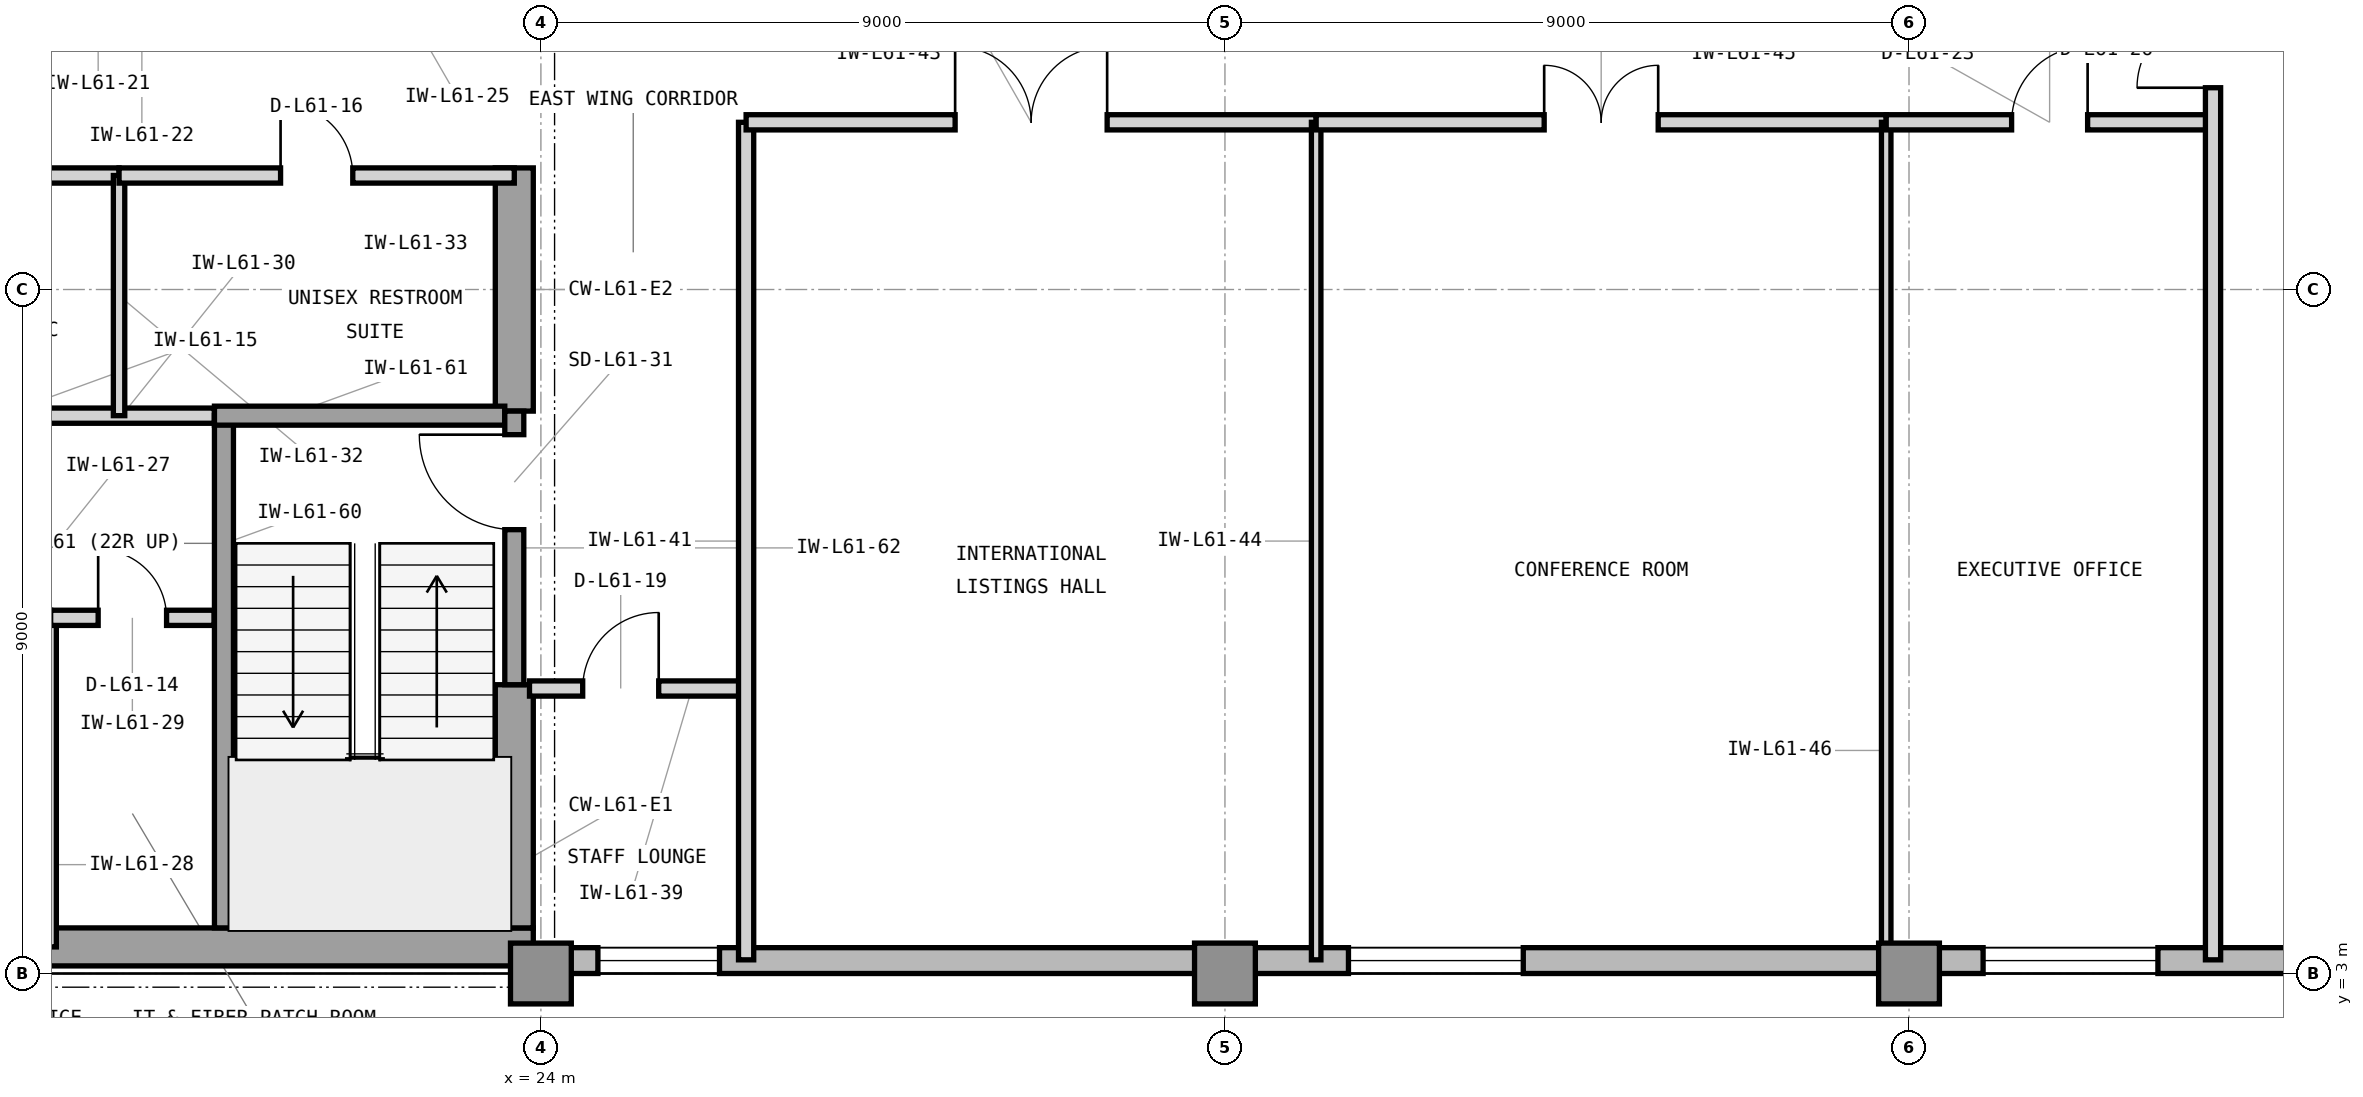
"""IFC4 building model, lengths in metres.
Left out: names, types, materials, properties, quantities, classifications, styles, units other than length and angle.
Written with IfcOpenShell. Run it as: python <this file> out.ifc"""

import sys

from ifc_helpers import new_model, si_unit, direction, frame, frame_2d, origin, origin_2d, place, context, subcontext, project, spatial, rectangle, extrude, element, fill, save


model = new_model("IFC4")
c1 = context("Model", 3, precision=1e-05, world=origin(), true_north=direction((0.0, 1.0)))
c2 = subcontext(c1, "Body", "Model", "MODEL_VIEW")
j1 = project(units=[si_unit("LENGTHUNIT", "METRE"), si_unit("PLANEANGLEUNIT", "RADIAN")], contexts=[c1])
p1 = place(None, origin())
s1 = spatial("IfcSite", under=j1, at=p1, CompositionType="ELEMENT")
p2 = place(p1, origin())
s2 = spatial("IfcBuilding", under=s1, at=p2, CompositionType="ELEMENT")
p3 = place(p2, frame((0.0, 0.0, 250.8)))
s3 = spatial("IfcBuildingStorey", under=s2, at=p3, CompositionType="ELEMENT", Elevation=250.8)
p4 = place(p3, frame((7.475, 3.35, 0.0), z_axis=(0.0, 0.0, 1.0), x_axis=(1.0, 0.0, 0.0)))
e1 = element("IfcWall", 1, at=p4, inside=s3, PredefinedType="SHEAR", context=c2, shape_type="SweptSolid", body=[
    extrude(rectangle(XDim=16.425, YDim=0.5, at=frame_2d((8.212, 0.0))), origin(), (0.0, 0.0, 1.0), 3.9),
])
p5 = place(p3, frame((23.65, 3.6, 0.0), z_axis=(0.0, 0.0, 1.0), x_axis=(0.0, 1.0, 0.0)))
e2 = element("IfcWall", 2, at=p5, inside=s3, PredefinedType="SHEAR", context=c2, shape_type="SweptSolid", body=[
    extrude(rectangle(XDim=3.2, YDim=0.5, at=frame_2d((1.6, 0.0))), origin(), (0.0, 0.0, 1.0), 3.9),
])
p6 = place(p3, frame((23.65, 10.4, 0.0), z_axis=(0.0, 0.0, 1.0), x_axis=(0.0, 1.0, 0.0)))
e3 = element("IfcWall", 3, at=p6, inside=s3, PredefinedType="SHEAR", context=c2, shape_type="SweptSolid", body=[
    extrude(rectangle(XDim=3.2, YDim=0.5, at=frame_2d((1.6, 0.0))), origin(), (0.0, 0.0, 1.0), 3.9),
])
for number, where, z_axis, x_axis in (
    (4, (24.0, 3.0, 0.0), (0.0, 0.0, 1.0), (1.0, 0.0, 0.0)),
    (5, (33.0, 3.0, 0.0), (0.0, 0.0, 1.0), (1.0, 0.0, 0.0)),
    (6, (42.0, 3.0, 0.0), (0.0, 0.0, 1.0), (1.0, 0.0, 0.0)),
):
    element("IfcColumn", number, at=place(p3, frame(where, z_axis=z_axis, x_axis=x_axis)), inside=s3, PredefinedType="COLUMN", context=c2, shape_type="SweptSolid", body=[
        extrude(rectangle(XDim=0.8, YDim=0.8, at=origin_2d()), origin(), (0.0, 0.0, 1.0), 3.9),
    ])
p7 = place(p3, frame((23.9, 3.17, 0.0), z_axis=(0.0, 0.0, 1.0), x_axis=(1.0, 0.0, 0.0)))
e7 = element("IfcWall", 7, at=p7, inside=s3, PredefinedType="STANDARD", context=c2, shape_type="SweptSolid", body=[
    extrude(rectangle(XDim=28.5, YDim=0.34, at=frame_2d((14.25, 0.0))), origin(), (0.0, 0.0, 1.0), 3.715),
])
p8 = place(p7, frame((10.725, 0.0, 0.9)))
e8 = element("IfcOpeningElement", 8, at=p8, cuts=e7, PredefinedType="OPENING", context=c2, shape_type="SweptSolid", body=[
    extrude(rectangle(XDim=2.3, YDim=2.2, at=frame_2d((1.15, 1.1))), frame((0.0, 0.18, 0.0), z_axis=(0.0, -1.0, 0.0), x_axis=(1.0, 0.0, 0.0)), (0.0, 0.0, 1.0), 0.36),
])
p9 = place(p7, frame((0.85, 0.0, 0.9)))
e9 = element("IfcOpeningElement", 9, at=p9, cuts=e7, PredefinedType="OPENING", context=c2, shape_type="SweptSolid", body=[
    extrude(rectangle(XDim=1.6, YDim=2.2, at=frame_2d((0.8, 1.1))), frame((0.0, 0.18, 0.0), z_axis=(0.0, -1.0, 0.0), x_axis=(1.0, 0.0, 0.0)), (0.0, 0.0, 1.0), 0.36),
])
p10 = place(p7, frame((19.075, 0.0, 0.9)))
e10 = element("IfcOpeningElement", 10, at=p10, cuts=e7, PredefinedType="OPENING", context=c2, shape_type="SweptSolid", body=[
    extrude(rectangle(XDim=2.3, YDim=2.2, at=frame_2d((1.15, 1.1))), frame((0.0, 0.18, 0.0), z_axis=(0.0, -1.0, 0.0), x_axis=(1.0, 0.0, 0.0)), (0.0, 0.0, 1.0), 0.36),
])
p11 = place(p3, frame((17.55, 3.35, 0.0), z_axis=(0.0, 0.0, 1.0), x_axis=(0.0, 1.0, 0.0)))
e11 = element("IfcWall", 11, at=p11, inside=s3, PredefinedType="PARTITIONING", context=c2, shape_type="SweptSolid", body=[
    extrude(rectangle(XDim=4.33, YDim=0.15, at=frame_2d((2.165, 0.0))), origin(), (0.0, 0.0, 1.0), 3.63),
])
p12 = place(p3, frame((17.55, 7.68, 0.0), z_axis=(0.0, 0.0, 1.0), x_axis=(1.0, 0.0, 0.0)))
e12 = element("IfcWall", 12, at=p12, inside=s3, PredefinedType="PARTITIONING", context=c2, shape_type="SweptSolid", body=[
    extrude(rectangle(XDim=2.15, YDim=0.2, at=frame_2d((1.075, 0.0))), origin(), (0.0, 0.0, 1.0), 3.63),
])
p13 = place(p12, frame((0.625, 0.0, 0.0)))
e13 = element("IfcOpeningElement", 13, at=p13, cuts=e12, PredefinedType="OPENING", context=c2, shape_type="SweptSolid", body=[
    extrude(rectangle(XDim=0.9, YDim=2.1, at=frame_2d((0.45, 1.05))), frame((0.0, 0.11, 0.0), z_axis=(0.0, -1.0, 0.0), x_axis=(1.0, 0.0, 0.0)), (0.0, 0.0, 1.0), 0.22),
])
p14 = place(p3, frame((14.825, 10.34, 0.0), z_axis=(0.0, 0.0, 1.0), x_axis=(1.0, 0.0, 0.0)))
e14 = element("IfcWall", 14, at=p14, inside=s3, PredefinedType="PARTITIONING", context=c2, shape_type="SweptSolid", body=[
    extrude(rectangle(XDim=4.88, YDim=0.2, at=frame_2d((2.44, 0.0))), origin(), (0.0, 0.0, 1.0), 3.088),
])
p15 = place(p3, frame((14.7, 13.5, 0.0), z_axis=(0.0, 0.0, 1.0), x_axis=(1.0, 0.0, 0.0)))
e15 = element("IfcWall", 15, at=p15, inside=s3, PredefinedType="PARTITIONING", context=c2, shape_type="SweptSolid", body=[
    extrude(rectangle(XDim=3.75, YDim=0.2, at=frame_2d((1.875, 0.0))), origin(), (0.0, 0.0, 1.0), 3.088),
])
p16 = place(p15, frame((1.4, 0.0, 0.0)))
e16 = element("IfcOpeningElement", 16, at=p16, cuts=e15, PredefinedType="OPENING", context=c2, shape_type="SweptSolid", body=[
    extrude(rectangle(XDim=0.95, YDim=2.1, at=frame_2d((0.475, 1.05))), frame((0.0, 0.11, 0.0), z_axis=(0.0, -1.0, 0.0), x_axis=(1.0, 0.0, 0.0)), (0.0, 0.0, 1.0), 0.22),
])
p17 = place(p3, frame((18.45, 10.34, 0.0), z_axis=(0.0, 0.0, 1.0), x_axis=(0.0, 1.0, 0.0)))
e17 = element("IfcWall", 17, at=p17, inside=s3, PredefinedType="PARTITIONING", context=c2, shape_type="SweptSolid", body=[
    extrude(rectangle(XDim=3.16, YDim=0.15, at=frame_2d((1.58, 0.0))), origin(), (0.0, 0.0, 1.0), 3.63),
])
p18 = place(p3, frame((18.45, 13.5, 0.0), z_axis=(0.0, 0.0, 1.0), x_axis=(1.0, 0.0, 0.0)))
e18 = element("IfcWall", 18, at=p18, inside=s3, PredefinedType="PARTITIONING", context=c2, shape_type="SweptSolid", body=[
    extrude(rectangle(XDim=5.2, YDim=0.2, at=frame_2d((2.6, 0.0))), origin(), (0.0, 0.0, 1.0), 3.088),
])
p19 = place(p18, frame((2.125, 0.0, 0.0)))
e19 = element("IfcOpeningElement", 19, at=p19, cuts=e18, PredefinedType="OPENING", context=c2, shape_type="SweptSolid", body=[
    extrude(rectangle(XDim=0.95, YDim=2.1, at=frame_2d((0.475, 1.05))), frame((0.0, 0.11, 0.0), z_axis=(0.0, -1.0, 0.0), x_axis=(1.0, 0.0, 0.0)), (0.0, 0.0, 1.0), 0.22),
])
p20 = place(p3, frame((23.85, 6.75, 0.0), z_axis=(0.0, 0.0, 1.0), x_axis=(1.0, 0.0, 0.0)))
e20 = element("IfcWall", 20, at=p20, inside=s3, PredefinedType="PARTITIONING", context=c2, shape_type="SweptSolid", body=[
    extrude(rectangle(XDim=2.85, YDim=0.2, at=frame_2d((1.425, 0.0))), origin(), (0.0, 0.0, 1.0), 3.63),
])
p21 = place(p20, frame((0.7, 0.0, 0.0)))
e21 = element("IfcOpeningElement", 21, at=p21, cuts=e20, PredefinedType="OPENING", context=c2, shape_type="SweptSolid", body=[
    extrude(rectangle(XDim=1.0, YDim=2.15, at=frame_2d((0.5, 1.075))), frame((0.0, 0.11, 0.0), z_axis=(0.0, -1.0, 0.0), x_axis=(1.0, 0.0, 0.0)), (0.0, 0.0, 1.0), 0.22),
])
p22 = place(p3, frame((26.7, 3.18, 0.0), z_axis=(0.0, 0.0, 1.0), x_axis=(0.0, 1.0, 0.0)))
e22 = element("IfcWall", 22, at=p22, inside=s3, PredefinedType="PARTITIONING", context=c2, shape_type="SweptSolid", body=[
    extrude(rectangle(XDim=11.02, YDim=0.2, at=frame_2d((5.51, 0.0))), origin(), (0.0, 0.0, 1.0), 3.63),
])
p23 = place(p3, frame((26.7, 14.2, 0.0), z_axis=(0.0, 0.0, 1.0), x_axis=(1.0, 0.0, 0.0)))
e23 = element("IfcWall", 23, at=p23, inside=s3, PredefinedType="PARTITIONING", context=c2, shape_type="SweptSolid", body=[
    extrude(rectangle(XDim=7.5, YDim=0.2, at=frame_2d((3.75, 0.0))), origin(), (0.0, 0.0, 1.0), 3.63),
])
p24 = place(p23, frame((2.75, 0.0, 0.0)))
e24 = element("IfcOpeningElement", 24, at=p24, cuts=e23, PredefinedType="OPENING", context=c2, shape_type="SweptSolid", body=[
    extrude(rectangle(XDim=2.0, YDim=2.5, at=frame_2d((1.0, 1.25))), frame((0.0, 0.11, 0.0), z_axis=(0.0, -1.0, 0.0), x_axis=(1.0, 0.0, 0.0)), (0.0, 0.0, 1.0), 0.22),
])
p25 = place(p3, frame((34.2, 3.18, 0.0), z_axis=(0.0, 0.0, 1.0), x_axis=(0.0, 1.0, 0.0)))
e25 = element("IfcWall", 25, at=p25, inside=s3, PredefinedType="PARTITIONING", context=c2, shape_type="SweptSolid", body=[
    extrude(rectangle(XDim=11.02, YDim=0.125, at=frame_2d((5.51, 0.0))), origin(), (0.0, 0.0, 1.0), 3.63),
])
p26 = place(p3, frame((34.2, 14.2, 0.0), z_axis=(0.0, 0.0, 1.0), x_axis=(1.0, 0.0, 0.0)))
e26 = element("IfcWall", 26, at=p26, inside=s3, PredefinedType="PARTITIONING", context=c2, shape_type="SweptSolid", body=[
    extrude(rectangle(XDim=7.5, YDim=0.2, at=frame_2d((3.75, 0.0))), origin(), (0.0, 0.0, 1.0), 3.63),
])
p27 = place(p26, frame((3.0, 0.0, 0.0)))
e27 = element("IfcOpeningElement", 27, at=p27, cuts=e26, PredefinedType="OPENING", context=c2, shape_type="SweptSolid", body=[
    extrude(rectangle(XDim=1.5, YDim=2.3, at=frame_2d((0.75, 1.15))), frame((0.0, 0.11, 0.0), z_axis=(0.0, -1.0, 0.0), x_axis=(1.0, 0.0, 0.0)), (0.0, 0.0, 1.0), 0.22),
])
p28 = place(p3, frame((41.7, 3.18, 0.0), z_axis=(0.0, 0.0, 1.0), x_axis=(0.0, 1.0, 0.0)))
e28 = element("IfcWall", 28, at=p28, inside=s3, PredefinedType="PARTITIONING", context=c2, shape_type="SweptSolid", body=[
    extrude(rectangle(XDim=11.02, YDim=0.125, at=frame_2d((5.51, 0.0))), origin(), (0.0, 0.0, 1.0), 3.63),
])
p29 = place(p3, frame((41.7, 14.2, 0.0), z_axis=(0.0, 0.0, 1.0), x_axis=(1.0, 0.0, 0.0)))
e29 = element("IfcWall", 29, at=p29, inside=s3, PredefinedType="PARTITIONING", context=c2, shape_type="SweptSolid", body=[
    extrude(rectangle(XDim=4.3, YDim=0.2, at=frame_2d((2.15, 0.0))), origin(), (0.0, 0.0, 1.0), 3.63),
])
p30 = place(p29, frame((1.65, 0.0, 0.0)))
e30 = element("IfcOpeningElement", 30, at=p30, cuts=e29, PredefinedType="OPENING", context=c2, shape_type="SweptSolid", body=[
    extrude(rectangle(XDim=1.0, YDim=2.15, at=frame_2d((0.5, 1.075))), frame((0.0, 0.11, 0.0), z_axis=(0.0, -1.0, 0.0), x_axis=(1.0, 0.0, 0.0)), (0.0, 0.0, 1.0), 0.22),
])
p31 = place(p3, frame((46.0, 3.18, 0.0), z_axis=(0.0, 0.0, 1.0), x_axis=(0.0, 1.0, 0.0)))
e31 = element("IfcWall", 31, at=p31, inside=s3, PredefinedType="PARTITIONING", context=c2, shape_type="SweptSolid", body=[
    extrude(rectangle(XDim=17.64, YDim=0.2, at=frame_2d((8.82, 0.0))), origin(), (0.0, 0.0, 1.0), 3.63),
])
p32 = place(p31, frame((11.475, 0.0, 0.0)))
e32 = element("IfcOpeningElement", 32, at=p32, cuts=e31, PredefinedType="OPENING", context=c2, shape_type="SweptSolid", body=[
    extrude(rectangle(XDim=1.0, YDim=2.15, at=frame_2d((0.5, 1.075))), frame((0.0, 0.11, 0.0), z_axis=(0.0, -1.0, 0.0), x_axis=(1.0, 0.0, 0.0)), (0.0, 0.0, 1.0), 0.22),
])
p33 = place(p3, frame((19.83, 3.6, 0.0), z_axis=(0.0, 0.0, 1.0), x_axis=(0.0, 1.0, 0.0)))
e33 = element("IfcWall", 33, at=p33, inside=s3, PredefinedType="SHEAR", context=c2, shape_type="SweptSolid", body=[
    extrude(rectangle(XDim=6.74, YDim=0.25, at=frame_2d((3.37, 0.0))), origin(), (0.0, 0.0, 1.0), 3.9),
])
p34 = place(p3, frame((19.705, 10.34, 0.0), z_axis=(0.0, 0.0, 1.0), x_axis=(1.0, 0.0, 0.0)))
e34 = element("IfcWall", 34, at=p34, inside=s3, PredefinedType="SHEAR", context=c2, shape_type="SweptSolid", body=[
    extrude(rectangle(XDim=3.82, YDim=0.25, at=frame_2d((1.91, 0.0))), origin(), (0.0, 0.0, 1.0), 3.9),
])
p35 = place(p3, frame((23.65, 6.8, 0.0), z_axis=(0.0, 0.0, 1.0), x_axis=(0.0, 1.0, 0.0)))
e35 = element("IfcWall", 35, at=p35, inside=s3, PredefinedType="SHEAR", context=c2, shape_type="SweptSolid", body=[
    extrude(rectangle(XDim=3.6, YDim=0.25, at=frame_2d((1.8, 0.0))), origin(), (0.0, 0.0, 1.0), 3.9),
])
p36 = place(p35, frame((2.04, 0.0, 0.0)))
e36 = element("IfcOpeningElement", 36, at=p36, cuts=e35, PredefinedType="OPENING", context=c2, shape_type="SweptSolid", body=[
    extrude(rectangle(XDim=1.25, YDim=2.2, at=frame_2d((0.625, 1.1))), frame((0.0, 0.135, 0.0), z_axis=(0.0, -1.0, 0.0), x_axis=(1.0, 0.0, 0.0)), (0.0, 0.0, 1.0), 0.27),
])
p37 = place(p8, origin())
e37 = element("IfcWindow", 37, at=p37, inside=s3, PartitioningType="SINGLE_PANEL", PredefinedType="WINDOW", context=c2, shape_type="SweptSolid", body=[
    extrude(rectangle(XDim=2.3, YDim=2.2, at=frame_2d((1.15, 1.1))), frame((0.0, 0.11, 0.0), z_axis=(0.0, -1.0, 0.0), x_axis=(1.0, 0.0, 0.0)), (0.0, 0.0, 1.0), 0.06),
])
fill(e8, e37)
p38 = place(p13, origin())
e38 = element("IfcDoor", 38, at=p38, inside=s3, OperationType="SINGLE_SWING_LEFT", PredefinedType="TRAPDOOR", context=c2, shape_type="SweptSolid", body=[
    extrude(rectangle(XDim=0.9, YDim=2.1, at=frame_2d((0.45, 1.05))), frame((0.0, 0.025, 0.0), z_axis=(0.0, -1.0, 0.0), x_axis=(1.0, 0.0, 0.0)), (0.0, 0.0, 1.0), 0.05),
])
fill(e13, e38)
p39 = place(p19, origin())
e39 = element("IfcDoor", 39, at=p39, inside=s3, OperationType="SINGLE_SWING_LEFT", PredefinedType="DOOR", context=c2, shape_type="SweptSolid", body=[
    extrude(rectangle(XDim=0.95, YDim=2.1, at=frame_2d((0.475, 1.05))), frame((0.0, 0.025, 0.0), z_axis=(0.0, -1.0, 0.0), x_axis=(1.0, 0.0, 0.0)), (0.0, 0.0, 1.0), 0.05),
])
fill(e19, e39)
p40 = place(p21, origin())
e40 = element("IfcDoor", 40, at=p40, inside=s3, OperationType="SINGLE_SWING_RIGHT", PredefinedType="DOOR", context=c2, shape_type="SweptSolid", body=[
    extrude(rectangle(XDim=1.0, YDim=2.15, at=frame_2d((0.5, 1.075))), frame((0.0, 0.025, 0.0), z_axis=(0.0, -1.0, 0.0), x_axis=(1.0, 0.0, 0.0)), (0.0, 0.0, 1.0), 0.05),
])
fill(e21, e40)
p41 = place(p24, origin())
e41 = element("IfcDoor", 41, at=p41, inside=s3, OperationType="DOUBLE_DOOR_SINGLE_SWING", PredefinedType="DOOR", context=c2, shape_type="SweptSolid", body=[
    extrude(rectangle(XDim=2.0, YDim=2.5, at=frame_2d((1.0, 1.25))), frame((0.0, 0.025, 0.0), z_axis=(0.0, -1.0, 0.0), x_axis=(1.0, 0.0, 0.0)), (0.0, 0.0, 1.0), 0.05),
])
fill(e24, e41)
p42 = place(p27, origin())
e42 = element("IfcDoor", 42, at=p42, inside=s3, OperationType="DOUBLE_DOOR_SINGLE_SWING", PredefinedType="DOOR", context=c2, shape_type="SweptSolid", body=[
    extrude(rectangle(XDim=1.5, YDim=2.3, at=frame_2d((0.75, 1.15))), frame((0.0, 0.025, 0.0), z_axis=(0.0, -1.0, 0.0), x_axis=(1.0, 0.0, 0.0)), (0.0, 0.0, 1.0), 0.05),
])
fill(e27, e42)
p43 = place(p30, origin())
e43 = element("IfcDoor", 43, at=p43, inside=s3, OperationType="SINGLE_SWING_RIGHT", PredefinedType="DOOR", context=c2, shape_type="SweptSolid", body=[
    extrude(rectangle(XDim=1.0, YDim=2.15, at=frame_2d((0.5, 1.075))), frame((0.0, 0.025, 0.0), z_axis=(0.0, -1.0, 0.0), x_axis=(1.0, 0.0, 0.0)), (0.0, 0.0, 1.0), 0.05),
])
fill(e30, e43)
p44 = place(p32, origin())
e44 = element("IfcDoor", 44, at=p44, inside=s3, OperationType="SINGLE_SWING_LEFT", PredefinedType="DOOR", context=c2, shape_type="SweptSolid", body=[
    extrude(rectangle(XDim=1.0, YDim=2.15, at=frame_2d((0.5, 1.075))), frame((0.0, 0.025, 0.0), z_axis=(0.0, -1.0, 0.0), x_axis=(1.0, 0.0, 0.0)), (0.0, 0.0, 1.0), 0.05),
])
fill(e32, e44)
p45 = place(p36, origin())
e45 = element("IfcDoor", 45, at=p45, inside=s3, OperationType="SINGLE_SWING_RIGHT", PredefinedType="DOOR", context=c2, shape_type="SweptSolid", body=[
    extrude(rectangle(XDim=1.25, YDim=2.2, at=frame_2d((0.625, 1.1))), frame((0.0, 0.025, 0.0), z_axis=(0.0, -1.0, 0.0), x_axis=(1.0, 0.0, 0.0)), (0.0, 0.0, 1.0), 0.05),
])
fill(e36, e45)
p46 = place(p9, origin())
e46 = element("IfcWindow", 46, at=p46, inside=s3, PartitioningType="SINGLE_PANEL", PredefinedType="WINDOW", context=c2, shape_type="SweptSolid", body=[
    extrude(rectangle(XDim=1.6, YDim=2.2, at=frame_2d((0.8, 1.1))), frame((0.0, 0.11, 0.0), z_axis=(0.0, -1.0, 0.0), x_axis=(1.0, 0.0, 0.0)), (0.0, 0.0, 1.0), 0.06),
])
fill(e9, e46)
p47 = place(p10, origin())
e47 = element("IfcWindow", 47, at=p47, inside=s3, PartitioningType="SINGLE_PANEL", PredefinedType="WINDOW", context=c2, shape_type="SweptSolid", body=[
    extrude(rectangle(XDim=2.3, YDim=2.2, at=frame_2d((1.15, 1.1))), frame((0.0, 0.11, 0.0), z_axis=(0.0, -1.0, 0.0), x_axis=(1.0, 0.0, 0.0)), (0.0, 0.0, 1.0), 0.06),
])
fill(e10, e47)
save(model, sys.argv[1])
